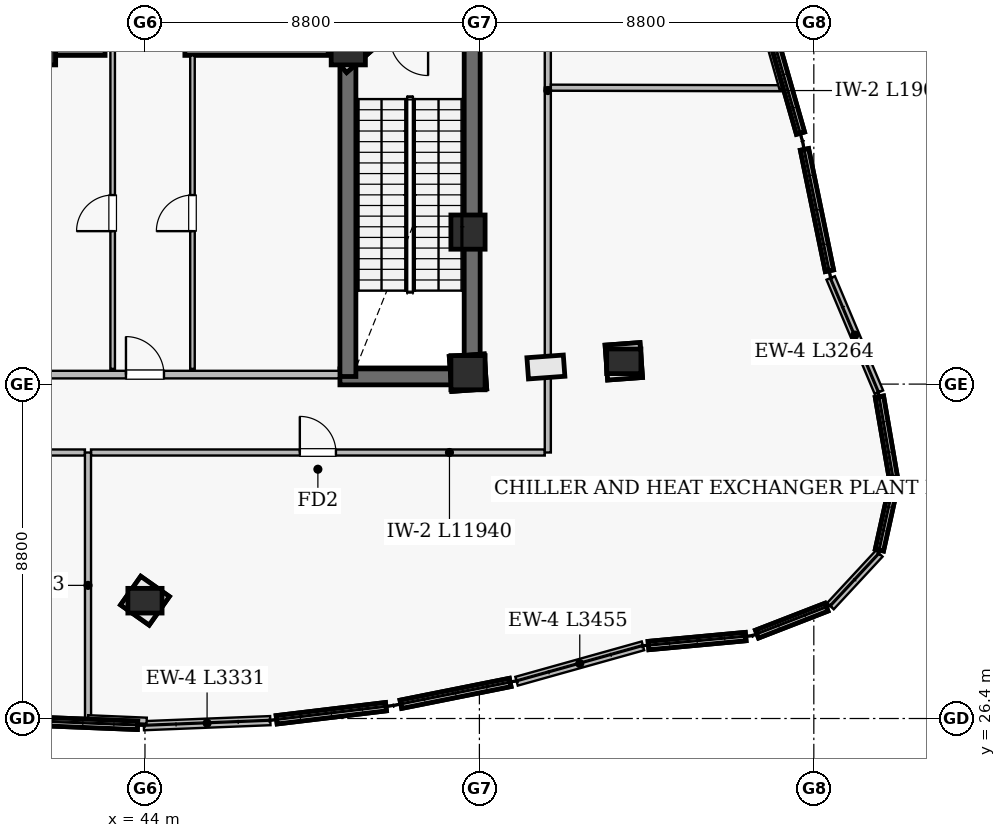
"""IFC4 building model, lengths in metres.
Left out: names, types, materials, properties, quantities, classifications, styles, units other than length and angle.
Written with IfcOpenShell. Run it as: python <this file> out.ifc"""

import sys

from ifc_helpers import new_model, si_unit, direction, frame, frame_2d, origin, origin_2d, place, context, subcontext, project, spatial, rectangle, extrude, element, fill, save


model = new_model("IFC4")
c1 = context("Model", 3, precision=1e-05, world=origin(), true_north=direction((0.0, 1.0)))
c2 = subcontext(c1, "Body", "Model", "MODEL_VIEW")
j1 = project(units=[si_unit("LENGTHUNIT", "METRE"), si_unit("PLANEANGLEUNIT", "RADIAN")], contexts=[c1])
p1 = place(None, origin())
s1 = spatial("IfcSite", under=j1, at=p1, CompositionType="ELEMENT")
p2 = place(p1, origin())
s2 = spatial("IfcBuilding", under=s1, at=p2, CompositionType="ELEMENT")
p3 = place(p2, frame((0.0, 0.0, 282.8)))
s3 = spatial("IfcBuildingStorey", under=s2, at=p3, CompositionType="ELEMENT", Elevation=282.8)
p4 = place(p3, frame((49.13, 35.39, 0.0), z_axis=(0.0, 0.0, 1.0), x_axis=(1.0, 0.0, 0.0)))
e1 = element("IfcWall", 1, at=p4, inside=s3, PredefinedType="SHEAR", context=c2, shape_type="SweptSolid", body=[
    extrude(rectangle(XDim=3.69, YDim=0.42, at=frame_2d((1.845, 0.0))), origin(), (0.0, 0.0, 1.0), 6.51),
])
p5 = place(p3, frame((52.61, 35.18, 0.0), z_axis=(0.0, 0.0, 1.0), x_axis=(0.0, 1.0, 0.0)))
e2 = element("IfcWall", 2, at=p5, inside=s3, PredefinedType="SHEAR", context=c2, shape_type="SweptSolid", body=[
    extrude(rectangle(XDim=9.17, YDim=0.42, at=frame_2d((4.585, 0.0))), origin(), (0.0, 0.0, 1.0), 6.51),
])
p6 = place(p3, frame((49.34, 35.4, 0.0), z_axis=(0.0, 0.0, 1.0), x_axis=(0.0, 1.0, 0.0)))
e3 = element("IfcWall", 3, at=p6, inside=s3, PredefinedType="SHEAR", context=c2, shape_type="SweptSolid", body=[
    extrude(rectangle(XDim=8.95, YDim=0.42, at=frame_2d((4.475, 0.0))), origin(), (0.0, 0.0, 1.0), 6.51),
])
for number, where, z_axis, x_axis in (
    (4, (38.75, 44.05, 0.0), (0.0, 0.0, 1.0), (1.0, 0.0, 0.0)),
    (5, (45.05, 44.05, 0.0), (0.0, 0.0, 1.0), (1.0, 0.0, 0.0)),
):
    element("IfcWall", number, at=place(p3, frame(where, z_axis=z_axis, x_axis=x_axis)), inside=s3, PredefinedType="SHEAR", context=c2, shape_type="SweptSolid", body=[
        extrude(rectangle(XDim=4.2, YDim=0.4, at=frame_2d((2.1, 0.0))), origin(), (0.0, 0.0, 1.0), 6.51),
    ])
for number, where, z_axis, x_axis in (
    (6, (52.5, 35.5, 0.0), (0.0, 0.0, 1.0), (1.0, 0.0, 0.0)),
    (7, (52.5, 39.2, 0.0), (0.0, 0.0, 1.0), (1.0, 0.0, 0.0)),
    (8, (49.35, 44.05, 0.0), (0.0, 0.0, 1.0), (1.0, 0.0, 0.0)),
    (9, (41.2, 44.05, 0.0), (0.0, 0.0, 1.0), (1.0, 0.0, 0.0)),
):
    element("IfcColumn", number, at=place(p3, frame(where, z_axis=z_axis, x_axis=x_axis)), inside=s3, PredefinedType="COLUMN", context=c2, shape_type="SweptSolid", body=[
        extrude(rectangle(XDim=0.9, YDim=0.9, at=origin_2d()), origin(), (0.0, 0.0, 1.0), 6.8),
    ])
for number, where, z_axis, x_axis in (
    (10, (56.6, 35.8, 0.0), (0.0, 0.0, 1.0), (1.0, 0.0, 0.0)),
    (11, (44.0, 29.5, 0.0), (0.0, 0.0, 1.0), (1.0, 0.0, 0.0)),
):
    element("IfcColumn", number, at=place(p3, frame(where, z_axis=z_axis, x_axis=x_axis)), inside=s3, PredefinedType="COLUMN", context=c2, shape_type="SweptSolid", body=[
        extrude(rectangle(XDim=0.9, YDim=0.65, at=origin_2d()), origin(), (0.0, 0.0, 1.0), 6.8),
    ])
p7 = place(p3, frame((43.97, 26.211, 0.0), z_axis=(0.0, 0.0, 1.0), x_axis=(0.999199201801, 0.040011937234, 0.0)))
e12 = element("IfcWall", 12, at=p7, inside=s3, PredefinedType="SOLIDWALL", context=c2, shape_type="SweptSolid", body=[
    extrude(rectangle(XDim=3.332, YDim=0.24, at=frame_2d((1.666, 0.0))), origin(), (0.0, 0.0, 1.0), 6.51),
])
p8 = place(p3, frame((53.778, 27.381, 0.0), z_axis=(0.0, 0.0, 1.0), x_axis=(0.962969157375, 0.269611576059, 0.0)))
e13 = element("IfcWall", 13, at=p8, inside=s3, PredefinedType="SOLIDWALL", context=c2, shape_type="SweptSolid", body=[
    extrude(rectangle(XDim=3.455, YDim=0.24, at=frame_2d((1.727, 0.0))), origin(), (0.0, 0.0, 1.0), 6.51),
])
p9 = place(p3, frame((62.035, 29.355, 0.0), z_axis=(0.0, 0.0, 1.0), x_axis=(0.680138997812, 0.733083176491, 0.0)))
e14 = element("IfcWall", 14, at=p9, inside=s3, PredefinedType="SOLIDWALL", context=c2, shape_type="SweptSolid", body=[
    extrude(rectangle(XDim=1.891, YDim=0.24, at=frame_2d((0.945, 0.0))), origin(), (0.0, 0.0, 1.0), 6.51),
])
p10 = place(p3, frame((63.312, 34.986, 0.0), z_axis=(0.0, 0.0, 1.0), x_axis=(-0.388595330771, 0.921408524436, 0.0)))
e15 = element("IfcWall", 15, at=p10, inside=s3, PredefinedType="SOLIDWALL", context=c2, shape_type="SweptSolid", body=[
    extrude(rectangle(XDim=3.264, YDim=0.24, at=frame_2d((1.632, 0.0))), origin(), (0.0, 0.0, 1.0), 6.51),
])
p11 = place(p3, frame((42.58, 33.4, 0.0), z_axis=(0.0, 0.0, 1.0), x_axis=(1.0, 0.0, 0.0)))
e16 = element("IfcWall", 16, at=p11, inside=s3, PredefinedType="SOLIDWALL", context=c2, shape_type="SweptSolid", body=[
    extrude(rectangle(XDim=11.94, YDim=0.16, at=frame_2d((5.97, 0.0))), origin(), (0.0, 0.0, 1.0), 5.798),
])
p12 = place(p11, frame((5.495, 0.0, 0.0)))
e17 = element("IfcOpeningElement", 17, at=p12, cuts=e16, PredefinedType="OPENING", context=c2, shape_type="SweptSolid", body=[
    extrude(rectangle(XDim=0.95, YDim=2.15, at=frame_2d((0.475, 1.075))), frame((0.0, 0.09, 0.0), z_axis=(0.0, -1.0, 0.0), x_axis=(1.0, 0.0, 0.0)), (0.0, 0.0, 1.0), 0.18),
])
p13 = place(p3, frame((38.9, 35.45, 0.0), z_axis=(0.0, 0.0, 1.0), x_axis=(1.0, 0.0, 0.0)))
e18 = element("IfcWall", 18, at=p13, inside=s3, PredefinedType="SOLIDWALL", context=c2, shape_type="SweptSolid", body=[
    extrude(rectangle(XDim=10.2, YDim=0.2, at=frame_2d((5.1, 0.0))), origin(), (0.0, 0.0, 1.0), 6.51),
])
p14 = place(p13, frame((4.6, 0.0, 0.0)))
e19 = element("IfcOpeningElement", 19, at=p14, cuts=e18, PredefinedType="OPENING", context=c2, shape_type="SweptSolid", body=[
    extrude(rectangle(XDim=1.0, YDim=2.15, at=frame_2d((0.5, 1.075))), frame((0.0, 0.11, 0.0), z_axis=(0.0, -1.0, 0.0), x_axis=(1.0, 0.0, 0.0)), (0.0, 0.0, 1.0), 0.22),
])
p15 = place(p3, frame((43.15, 35.6, 0.0), z_axis=(0.0, 0.0, 1.0), x_axis=(0.0, 1.0, 0.0)))
e20 = element("IfcWall", 20, at=p15, inside=s3, PredefinedType="PARTITIONING", context=c2, shape_type="SweptSolid", body=[
    extrude(rectangle(XDim=8.7, YDim=0.12, at=frame_2d((4.35, 0.0))), origin(), (0.0, 0.0, 1.0), 6.51),
])
p16 = place(p15, frame((3.625, 0.0, 0.0)))
e21 = element("IfcOpeningElement", 21, at=p16, cuts=e20, PredefinedType="OPENING", context=c2, shape_type="SweptSolid", body=[
    extrude(rectangle(XDim=0.95, YDim=2.1, at=frame_2d((0.475, 1.05))), frame((0.0, 0.07, 0.0), z_axis=(0.0, -1.0, 0.0), x_axis=(1.0, 0.0, 0.0)), (0.0, 0.0, 1.0), 0.14),
])
p17 = place(p3, frame((45.25, 35.6, 0.0), z_axis=(0.0, 0.0, 1.0), x_axis=(0.0, 1.0, 0.0)))
e22 = element("IfcWall", 22, at=p17, inside=s3, PredefinedType="PARTITIONING", context=c2, shape_type="SweptSolid", body=[
    extrude(rectangle(XDim=8.25, YDim=0.12, at=frame_2d((4.125, 0.0))), origin(), (0.0, 0.0, 1.0), 6.51),
])
p18 = place(p17, frame((3.625, 0.0, 0.0)))
e23 = element("IfcOpeningElement", 23, at=p18, cuts=e22, PredefinedType="OPENING", context=c2, shape_type="SweptSolid", body=[
    extrude(rectangle(XDim=0.95, YDim=2.1, at=frame_2d((0.475, 1.05))), frame((0.0, 0.07, 0.0), z_axis=(0.0, -1.0, 0.0), x_axis=(1.0, 0.0, 0.0)), (0.0, 0.0, 1.0), 0.14),
])
p19 = place(p3, frame((54.6, 33.4, 0.0), z_axis=(0.0, 0.0, 1.0), x_axis=(0.0, 1.0, 0.0)))
e24 = element("IfcWall", 24, at=p19, inside=s3, PredefinedType="SOLIDWALL", context=c2, shape_type="SweptSolid", body=[
    extrude(rectangle(XDim=9.6, YDim=0.16, at=frame_2d((4.8, 0.0))), origin(), (0.0, 0.0, 1.0), 5.798),
])
p20 = place(p3, frame((54.6, 43.0, 0.0), z_axis=(0.0, 0.0, 1.0), x_axis=(0.0, 1.0, 0.0)))
e25 = element("IfcWall", 25, at=p20, inside=s3, PredefinedType="SOLIDWALL", context=c2, shape_type="SweptSolid", body=[
    extrude(rectangle(XDim=9.45, YDim=0.16, at=frame_2d((4.725, 0.0))), origin(), (0.0, 0.0, 1.0), 5.798),
])
p21 = place(p3, frame((33.48, 33.4, 0.0), z_axis=(0.0, 0.0, 1.0), x_axis=(1.0, 0.0, 0.0)))
e26 = element("IfcWall", 26, at=p21, inside=s3, PredefinedType="SOLIDWALL", context=c2, shape_type="SweptSolid", body=[
    extrude(rectangle(XDim=8.94, YDim=0.16, at=frame_2d((4.47, 0.0))), origin(), (0.0, 0.0, 1.0), 5.798),
])
p22 = place(p3, frame((42.502, 26.407, 0.0), z_axis=(0.0, 0.0, 1.0), x_axis=(-0.000279300342, 0.999999960996, 0.0)))
e27 = element("IfcWall", 27, at=p22, inside=s3, PredefinedType="SOLIDWALL", context=c2, shape_type="SweptSolid", body=[
    extrude(rectangle(XDim=6.993, YDim=0.16, at=frame_2d((3.497, 0.0))), origin(), (0.0, 0.0, 1.0), 5.798),
])
p23 = place(p3, frame((60.771, 42.985, 0.0), z_axis=(0.0, 0.0, 1.0), x_axis=(-0.999997011031, 0.002444980467, 0.0)))
e28 = element("IfcWall", 28, at=p23, inside=s3, PredefinedType="SOLIDWALL", context=c2, shape_type="SweptSolid", body=[
    extrude(rectangle(XDim=6.091, YDim=0.16, at=frame_2d((3.045, 0.0))), origin(), (0.0, 0.0, 1.0), 5.798),
])
p24 = place(p3, frame((60.771, 42.985, 0.0), z_axis=(0.0, 0.0, 1.0), x_axis=(-0.273544099142, 0.961859462616, 0.0)))
e29 = element("IfcWall", 29, at=p24, inside=s3, PredefinedType="SOLIDWALL", context=c2, shape_type="SweptSolid", body=[
    extrude(rectangle(XDim=2.192, YDim=0.16, at=frame_2d((1.096, 0.0))), origin(), (0.0, 0.0, 1.0), 6.51),
])
p25 = place(p3, frame((42.502, 26.407, 0.0), z_axis=(0.0, 0.0, 1.0), x_axis=(0.999108795234, -0.042209184862, 0.0)))
e30 = element("IfcWall", 30, at=p25, inside=s3, PredefinedType="SOLIDWALL", context=c2, shape_type="SweptSolid", body=[
    extrude(rectangle(XDim=1.544, YDim=0.16, at=frame_2d((0.772, 0.0))), origin(), (0.0, 0.0, 1.0), 6.51),
])
p26 = place(p14, origin())
e31 = element("IfcDoor", 31, at=p26, inside=s3, OperationType="SINGLE_SWING_LEFT", PredefinedType="DOOR", context=c2, shape_type="SweptSolid", body=[
    extrude(rectangle(XDim=1.0, YDim=2.15, at=frame_2d((0.5, 1.075))), frame((0.0, 0.025, 0.0), z_axis=(0.0, -1.0, 0.0), x_axis=(1.0, 0.0, 0.0)), (0.0, 0.0, 1.0), 0.05),
])
fill(e19, e31)
p27 = place(p16, origin())
e32 = element("IfcDoor", 32, at=p27, inside=s3, OperationType="SINGLE_SWING_LEFT", PredefinedType="DOOR", context=c2, shape_type="SweptSolid", body=[
    extrude(rectangle(XDim=0.95, YDim=2.1, at=frame_2d((0.475, 1.05))), frame((0.0, 0.025, 0.0), z_axis=(0.0, -1.0, 0.0), x_axis=(1.0, 0.0, 0.0)), (0.0, 0.0, 1.0), 0.05),
])
fill(e21, e32)
p28 = place(p18, origin())
e33 = element("IfcDoor", 33, at=p28, inside=s3, OperationType="SINGLE_SWING_LEFT", PredefinedType="DOOR", context=c2, shape_type="SweptSolid", body=[
    extrude(rectangle(XDim=0.95, YDim=2.1, at=frame_2d((0.475, 1.05))), frame((0.0, 0.025, 0.0), z_axis=(0.0, -1.0, 0.0), x_axis=(1.0, 0.0, 0.0)), (0.0, 0.0, 1.0), 0.05),
])
fill(e23, e33)
p29 = place(p12, origin())
e34 = element("IfcDoor", 34, at=p29, inside=s3, OperationType="SINGLE_SWING_LEFT", PredefinedType="DOOR", context=c2, shape_type="SweptSolid", body=[
    extrude(rectangle(XDim=0.95, YDim=2.15, at=frame_2d((0.475, 1.075))), frame((0.0, 0.025, 0.0), z_axis=(0.0, -1.0, 0.0), x_axis=(1.0, 0.0, 0.0)), (0.0, 0.0, 1.0), 0.05),
])
fill(e17, e34)
save(model, sys.argv[1])
